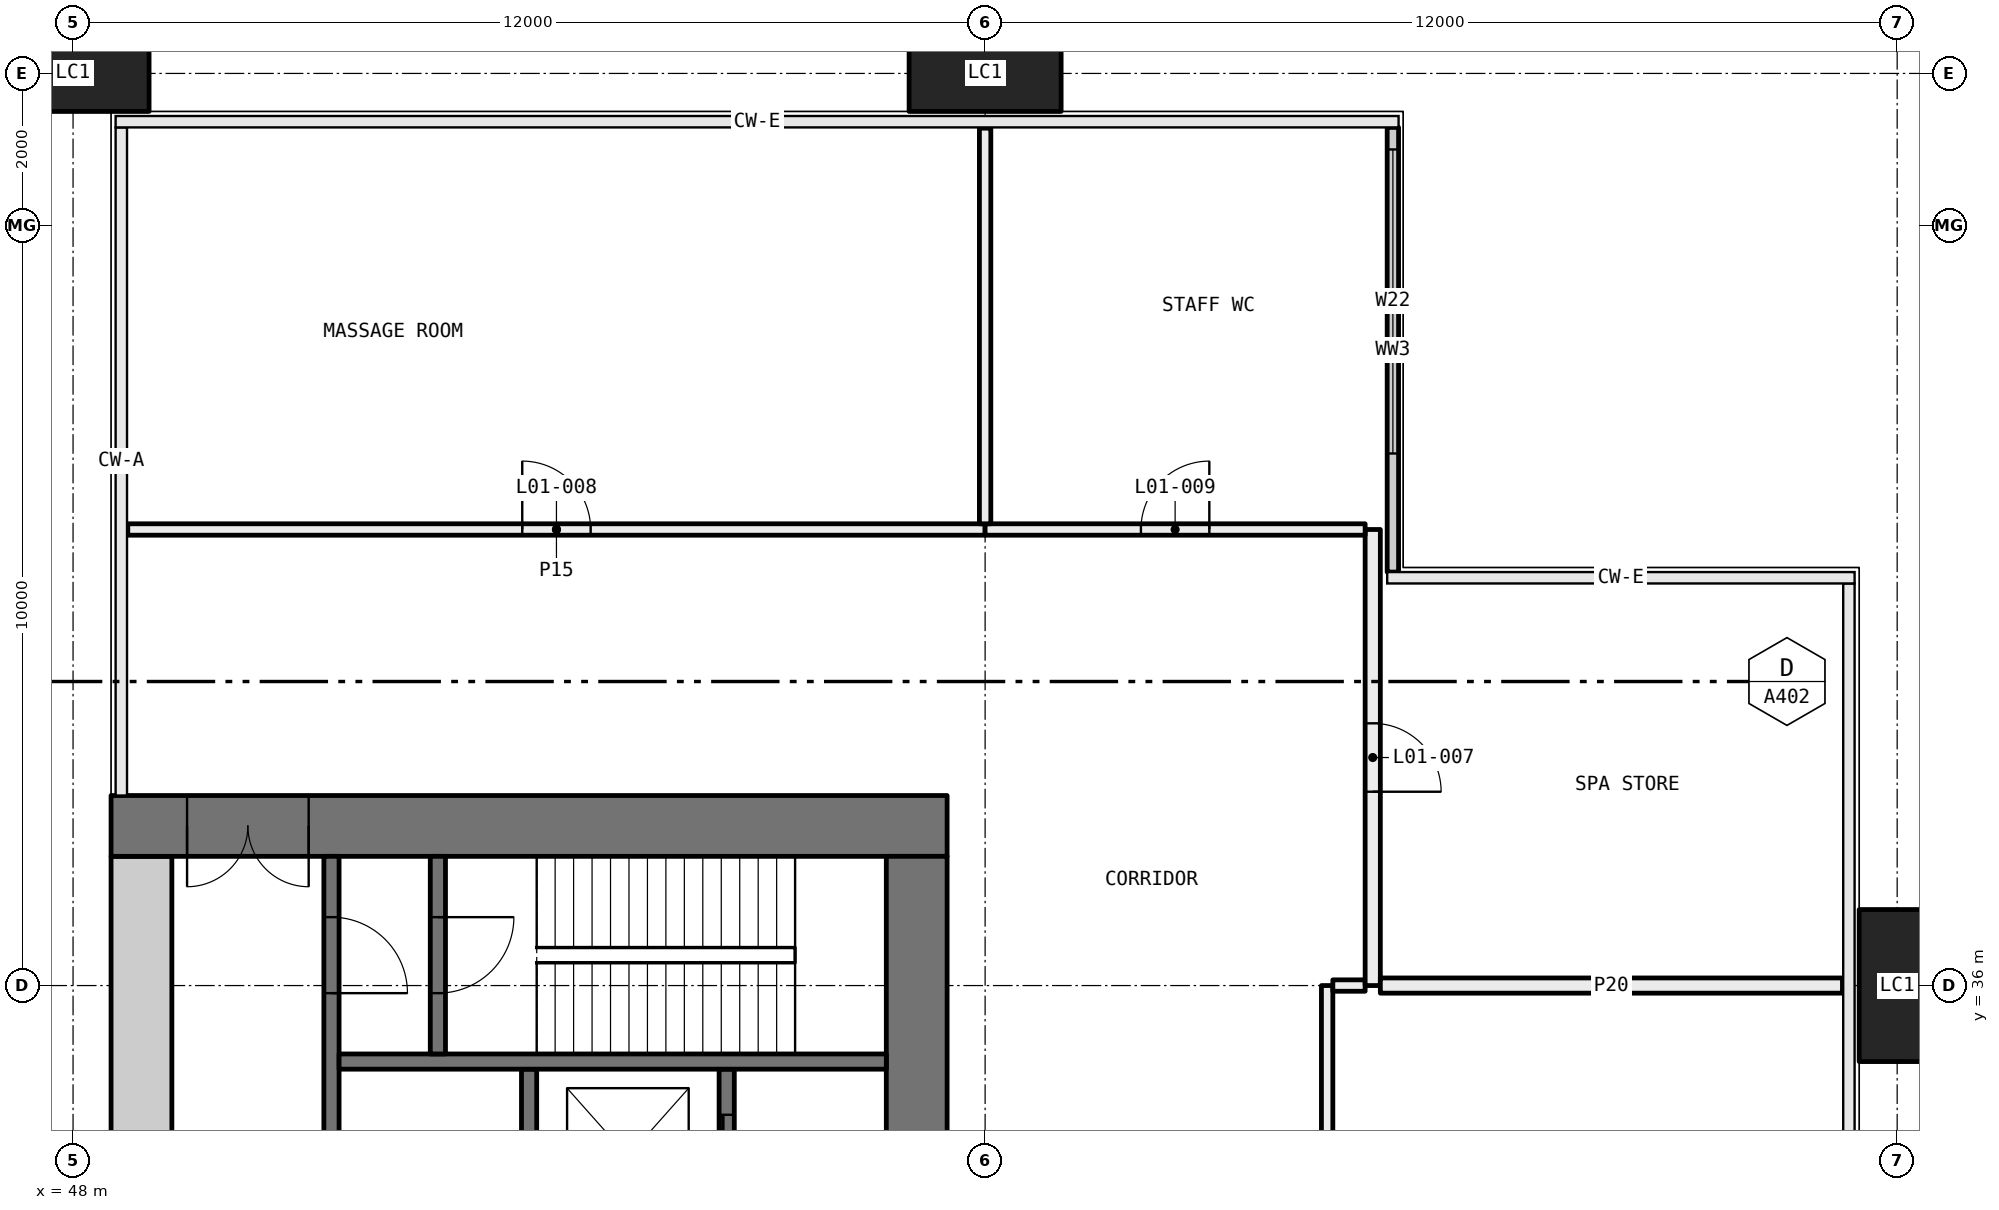
"""IFC4 building model, lengths in metres.
Left out: names, types, materials, properties, quantities, classifications, styles, units other than length and angle.
Written with IfcOpenShell. Run it as: python <this file> out.ifc"""

import sys

from ifc_helpers import new_model, si_unit, direction, frame, frame_2d, origin, origin_2d, place, context, subcontext, project, spatial, rectangle, hollow_rectangle, extrude, element, fill, save


model = new_model("IFC4")
c1 = context("Model", 3, precision=1e-05, world=origin(), true_north=direction((0.0, 1.0)))
c2 = subcontext(c1, "Body", "Model", "MODEL_VIEW")
j1 = project(units=[si_unit("LENGTHUNIT", "METRE"), si_unit("PLANEANGLEUNIT", "RADIAN")], contexts=[c1])
p1 = place(None, origin())
s1 = spatial("IfcSite", under=j1, at=p1, CompositionType="ELEMENT")
p2 = place(p1, origin())
s2 = spatial("IfcBuilding", under=s1, at=p2, CompositionType="ELEMENT")
p3 = place(p2, frame((0.0, 0.0, 6.0)))
s3 = spatial("IfcBuildingStorey", under=s2, at=p3, CompositionType="ELEMENT", Elevation=6.0)
for number, where, z_axis, x_axis in (
    (1, (48.0, 48.0, -0.4), (0.0, 0.0, 1.0), (1.0, 0.0, 0.0)),
    (2, (60.0, 48.0, -0.4), (0.0, 0.0, 1.0), (1.0, 0.0, 0.0)),
    (3, (72.0, 36.0, -0.4), (0.0, 0.0, 1.0), (0.0, 1.0, 0.0)),
):
    element("IfcColumn", number, at=place(p3, frame(where, z_axis=z_axis, x_axis=x_axis)), inside=s3, PredefinedType="COLUMN", context=c2, shape_type="SweptSolid", body=[
        extrude(hollow_rectangle(XDim=2.0, YDim=1.0, WallThickness=0.08, at=origin_2d()), origin(), (0.0, 0.0, 1.0), 6.0),
    ])
p4 = place(p3, frame((65.365, 41.44, 0.0), z_axis=(0.0, 0.0, 1.0), x_axis=(0.0, 1.0, 0.0)))
e4 = element("IfcWall", 4, at=p4, inside=s3, PredefinedType="ELEMENTEDWALL", context=c2, shape_type="SweptSolid", body=[
    extrude(rectangle(XDim=5.85, YDim=0.15, at=frame_2d((2.925, 0.0))), origin(), (0.0, 0.0, 1.0), 5.6),
])
p5 = place(p4, frame((1.56, 0.0, 0.45)))
e5 = element("IfcOpeningElement", 5, at=p5, cuts=e4, PredefinedType="OPENING", context=c2, shape_type="SweptSolid", body=[
    extrude(rectangle(XDim=4.0, YDim=5.1, at=frame_2d((2.0, 2.55))), frame((0.0, 0.085, 0.0), z_axis=(0.0, -1.0, 0.0), x_axis=(1.0, 0.0, 0.0)), (0.0, 0.0, 1.0), 0.17),
])
p6 = place(p3, frame((64.5, 30.075, 0.0), z_axis=(0.0, 0.0, 1.0), x_axis=(0.0, 1.0, 0.0)))
e6 = element("IfcWall", 6, at=p6, inside=s3, PredefinedType="PARTITIONING", context=c2, shape_type="SweptSolid", body=[
    extrude(rectangle(XDim=5.925, YDim=0.15, at=frame_2d((2.962, 0.0))), origin(), (0.0, 0.0, 1.0), 5.0),
])
p7 = place(p6, frame((2.512, 0.0, 0.0)))
e7 = element("IfcOpeningElement", 7, at=p7, cuts=e6, PredefinedType="OPENING", context=c2, shape_type="SweptSolid", body=[
    extrude(rectangle(XDim=0.9, YDim=2.1, at=frame_2d((0.45, 1.05))), frame((0.0, 0.085, 0.0), z_axis=(0.0, -1.0, 0.0), x_axis=(1.0, 0.0, 0.0)), (0.0, 0.0, 1.0), 0.17),
])
p8 = place(p3, frame((64.575, 36.0, 0.0), z_axis=(0.0, 0.0, 1.0), x_axis=(1.0, 0.0, 0.0)))
e8 = element("IfcWall", 8, at=p8, inside=s3, PredefinedType="PARTITIONING", context=c2, shape_type="SweptSolid", body=[
    extrude(rectangle(XDim=0.425, YDim=0.15, at=frame_2d((0.212, 0.0))), origin(), (0.0, 0.0, 1.0), 5.0),
])
p9 = place(p3, frame((65.1, 36.0, 0.0), z_axis=(0.0, 0.0, 1.0), x_axis=(0.0, 1.0, 0.0)))
e9 = element("IfcWall", 9, at=p9, inside=s3, PredefinedType="PARTITIONING", context=c2, shape_type="SweptSolid", body=[
    extrude(rectangle(XDim=6.0, YDim=0.2, at=frame_2d((3.0, 0.0))), origin(), (0.0, 0.0, 1.0), 5.0),
])
p10 = place(p9, frame((2.55, 0.0, 0.0)))
e10 = element("IfcOpeningElement", 10, at=p10, cuts=e9, PredefinedType="OPENING", context=c2, shape_type="SweptSolid", body=[
    extrude(rectangle(XDim=0.9, YDim=2.1, at=frame_2d((0.45, 1.05))), frame((0.0, 0.11, 0.0), z_axis=(0.0, -1.0, 0.0), x_axis=(1.0, 0.0, 0.0)), (0.0, 0.0, 1.0), 0.22),
])
p11 = place(p3, frame((60.0, 42.0, 0.0), z_axis=(0.0, 0.0, 1.0), x_axis=(-1.0, 0.0, 0.0)))
e11 = element("IfcWall", 11, at=p11, inside=s3, PredefinedType="PARTITIONING", context=c2, shape_type="SweptSolid", body=[
    extrude(rectangle(XDim=11.28, YDim=0.15, at=frame_2d((5.64, 0.0))), origin(), (0.0, 0.0, 1.0), 5.6),
])
p12 = place(p11, frame((5.19, 0.0, 0.0)))
e12 = element("IfcOpeningElement", 12, at=p12, cuts=e11, PredefinedType="OPENING", context=c2, shape_type="SweptSolid", body=[
    extrude(rectangle(XDim=0.9, YDim=2.1, at=frame_2d((0.45, 1.05))), frame((0.0, 0.085, 0.0), z_axis=(0.0, -1.0, 0.0), x_axis=(1.0, 0.0, 0.0)), (0.0, 0.0, 1.0), 0.17),
])
p13 = place(p3, frame((65.0, 42.0, 0.0), z_axis=(0.0, 0.0, 1.0), x_axis=(-1.0, 0.0, 0.0)))
e13 = element("IfcWall", 13, at=p13, inside=s3, PredefinedType="PARTITIONING", context=c2, shape_type="SweptSolid", body=[
    extrude(rectangle(XDim=5.0, YDim=0.15, at=frame_2d((2.5, 0.0))), origin(), (0.0, 0.0, 1.0), 5.6),
])
p14 = place(p13, frame((2.05, 0.0, 0.0)))
e14 = element("IfcOpeningElement", 14, at=p14, cuts=e13, PredefinedType="OPENING", context=c2, shape_type="SweptSolid", body=[
    extrude(rectangle(XDim=0.9, YDim=2.1, at=frame_2d((0.45, 1.05))), frame((0.0, 0.085, 0.0), z_axis=(0.0, -1.0, 0.0), x_axis=(1.0, 0.0, 0.0)), (0.0, 0.0, 1.0), 0.17),
])
p15 = place(p3, frame((71.28, 36.0, 0.0), z_axis=(0.0, 0.0, 1.0), x_axis=(-1.0, 0.0, 0.0)))
e15 = element("IfcWall", 15, at=p15, inside=s3, PredefinedType="PARTITIONING", context=c2, shape_type="SweptSolid", body=[
    extrude(rectangle(XDim=6.08, YDim=0.2, at=frame_2d((3.04, 0.0))), origin(), (0.0, 0.0, 1.0), 5.0),
])
p16 = place(p3, frame((60.0, 42.075, 0.0), z_axis=(0.0, 0.0, 1.0), x_axis=(0.0, 1.0, 0.0)))
e16 = element("IfcWall", 16, at=p16, inside=s3, PredefinedType="PARTITIONING", context=c2, shape_type="SweptSolid", body=[
    extrude(rectangle(XDim=5.205, YDim=0.15, at=frame_2d((2.603, 0.0))), origin(), (0.0, 0.0, 1.0), 5.6),
])
p17 = place(p3, frame((59.5, 38.1, 0.0), z_axis=(0.0, 0.0, 1.0), x_axis=(-1.0, 0.0, 0.0)))
e17 = element("IfcWall", 17, at=p17, inside=s3, PredefinedType="SHEAR", context=c2, shape_type="SweptSolid", body=[
    extrude(rectangle(XDim=11.0, YDim=0.8, at=frame_2d((5.5, 0.0))), origin(), (0.0, 0.0, 1.0), 5.6),
])
p18 = place(p17, frame((8.4, 0.0, 0.0)))
e18 = element("IfcOpeningElement", 18, at=p18, cuts=e17, PredefinedType="OPENING", context=c2, shape_type="SweptSolid", body=[
    extrude(rectangle(XDim=1.6, YDim=2.1, at=frame_2d((0.8, 1.05))), frame((0.0, 0.41, 0.0), z_axis=(0.0, -1.0, 0.0), x_axis=(1.0, 0.0, 0.0)), (0.0, 0.0, 1.0), 0.82),
])
p19 = place(p3, frame((59.1, 22.3, 0.0), z_axis=(0.0, 0.0, 1.0), x_axis=(0.0, 1.0, 0.0)))
e19 = element("IfcWall", 19, at=p19, inside=s3, PredefinedType="SHEAR", context=c2, shape_type="SweptSolid", body=[
    extrude(rectangle(XDim=15.4, YDim=0.8, at=frame_2d((7.7, 0.0))), origin(), (0.0, 0.0, 1.0), 5.6),
])
p20 = place(p19, frame((8.15, 0.0, 0.0)))
e20 = element("IfcOpeningElement", 20, at=p20, cuts=e19, PredefinedType="OPENING", context=c2, shape_type="SweptSolid", body=[
    extrude(rectangle(XDim=1.6, YDim=2.1, at=frame_2d((0.8, 1.05))), frame((0.0, 0.41, 0.0), z_axis=(0.0, -1.0, 0.0), x_axis=(1.0, 0.0, 0.0)), (0.0, 0.0, 1.0), 0.82),
])
p21 = place(p19, frame((2.05, 0.0, 0.0)))
e21 = element("IfcOpeningElement", 21, at=p21, cuts=e19, PredefinedType="OPENING", context=c2, shape_type="SweptSolid", body=[
    extrude(rectangle(XDim=1.0, YDim=2.1, at=frame_2d((0.5, 1.05))), frame((0.0, 0.41, 0.0), z_axis=(0.0, -1.0, 0.0), x_axis=(1.0, 0.0, 0.0)), (0.0, 0.0, 1.0), 0.82),
])
p22 = place(p3, frame((48.9, 22.3, 0.0), z_axis=(0.0, 0.0, 1.0), x_axis=(0.0, 1.0, 0.0)))
e22 = element("IfcWall", 22, at=p22, inside=s3, PredefinedType="SHEAR", context=c2, shape_type="SweptSolid", body=[
    extrude(rectangle(XDim=15.4, YDim=0.8, at=frame_2d((7.7, 0.0))), origin(), (0.0, 0.0, 1.0), 5.6),
])
p23 = place(p3, frame((56.6, 22.3, 0.0), z_axis=(0.0, 0.0, 1.0), x_axis=(0.0, 1.0, 0.0)))
e23 = element("IfcWall", 23, at=p23, inside=s3, PredefinedType="SOLIDWALL", context=c2, shape_type="SweptSolid", body=[
    extrude(rectangle(XDim=12.6, YDim=0.2, at=frame_2d((6.3, 0.0))), origin(), (0.0, 0.0, 1.0), 5.6),
])
p24 = place(p23, frame((3.4, 0.0, 0.0)))
e24 = element("IfcOpeningElement", 24, at=p24, cuts=e23, PredefinedType="OPENING", context=c2, shape_type="SweptSolid", body=[
    extrude(rectangle(XDim=1.1, YDim=2.1, at=frame_2d((0.55, 1.05))), frame((0.0, 0.11, 0.0), z_axis=(0.0, -1.0, 0.0), x_axis=(1.0, 0.0, 0.0)), (0.0, 0.0, 1.0), 0.22),
])
p25 = place(p23, frame((5.9, 0.0, 0.0)))
e25 = element("IfcOpeningElement", 25, at=p25, cuts=e23, PredefinedType="OPENING", context=c2, shape_type="SweptSolid", body=[
    extrude(rectangle(XDim=1.1, YDim=2.1, at=frame_2d((0.55, 1.05))), frame((0.0, 0.11, 0.0), z_axis=(0.0, -1.0, 0.0), x_axis=(1.0, 0.0, 0.0)), (0.0, 0.0, 1.0), 0.22),
])
p26 = place(p23, frame((8.4, 0.0, 0.0)))
e26 = element("IfcOpeningElement", 26, at=p26, cuts=e23, PredefinedType="OPENING", context=c2, shape_type="SweptSolid", body=[
    extrude(rectangle(XDim=1.1, YDim=2.1, at=frame_2d((0.55, 1.05))), frame((0.0, 0.11, 0.0), z_axis=(0.0, -1.0, 0.0), x_axis=(1.0, 0.0, 0.0)), (0.0, 0.0, 1.0), 0.22),
])
p27 = place(p23, frame((10.9, 0.0, 0.0)))
e27 = element("IfcOpeningElement", 27, at=p27, cuts=e23, PredefinedType="OPENING", context=c2, shape_type="SweptSolid", body=[
    extrude(rectangle(XDim=1.1, YDim=2.1, at=frame_2d((0.55, 1.05))), frame((0.0, 0.11, 0.0), z_axis=(0.0, -1.0, 0.0), x_axis=(1.0, 0.0, 0.0)), (0.0, 0.0, 1.0), 0.22),
])
p28 = place(p23, frame((0.15, 0.0, 0.0)))
e28 = element("IfcOpeningElement", 28, at=p28, cuts=e23, PredefinedType="OPENING", context=c2, shape_type="SweptSolid", body=[
    extrude(rectangle(XDim=1.0, YDim=2.1, at=frame_2d((0.5, 1.05))), frame((0.0, 0.11, 0.0), z_axis=(0.0, -1.0, 0.0), x_axis=(1.0, 0.0, 0.0)), (0.0, 0.0, 1.0), 0.22),
])
p29 = place(p3, frame((51.4, 25.1, 0.0), z_axis=(0.0, 0.0, 1.0), x_axis=(0.0, 1.0, 0.0)))
e29 = element("IfcWall", 29, at=p29, inside=s3, PredefinedType="SOLIDWALL", context=c2, shape_type="SweptSolid", body=[
    extrude(rectangle(XDim=12.6, YDim=0.2, at=frame_2d((6.3, 0.0))), origin(), (0.0, 0.0, 1.0), 5.6),
])
p30 = place(p29, frame((0.6, 0.0, 0.0)))
e30 = element("IfcOpeningElement", 30, at=p30, cuts=e29, PredefinedType="OPENING", context=c2, shape_type="SweptSolid", body=[
    extrude(rectangle(XDim=1.1, YDim=2.1, at=frame_2d((0.55, 1.05))), frame((0.0, 0.11, 0.0), z_axis=(0.0, -1.0, 0.0), x_axis=(1.0, 0.0, 0.0)), (0.0, 0.0, 1.0), 0.22),
])
p31 = place(p29, frame((10.8, 0.0, 0.0)))
e31 = element("IfcOpeningElement", 31, at=p31, cuts=e29, PredefinedType="OPENING", context=c2, shape_type="SweptSolid", body=[
    extrude(rectangle(XDim=1.0, YDim=2.1, at=frame_2d((0.5, 1.05))), frame((0.0, 0.11, 0.0), z_axis=(0.0, -1.0, 0.0), x_axis=(1.0, 0.0, 0.0)), (0.0, 0.0, 1.0), 0.22),
])
p32 = place(p29, frame((5.7, 0.0, 0.0)))
e32 = element("IfcOpeningElement", 32, at=p32, cuts=e29, PredefinedType="OPENING", context=c2, shape_type="SweptSolid", body=[
    extrude(rectangle(XDim=0.9, YDim=2.1, at=frame_2d((0.45, 1.05))), frame((0.0, 0.11, 0.0), z_axis=(0.0, -1.0, 0.0), x_axis=(1.0, 0.0, 0.0)), (0.0, 0.0, 1.0), 0.22),
])
p33 = place(p3, frame((54.0, 25.1, 0.0), z_axis=(0.0, 0.0, 1.0), x_axis=(0.0, 1.0, 0.0)))
e33 = element("IfcWall", 33, at=p33, inside=s3, PredefinedType="SOLIDWALL", context=c2, shape_type="SweptSolid", body=[
    extrude(rectangle(XDim=9.8, YDim=0.2, at=frame_2d((4.9, 0.0))), origin(), (0.0, 0.0, 1.0), 5.6),
])
p34 = place(p3, frame((58.7, 35.0, 0.0), z_axis=(0.0, 0.0, 1.0), x_axis=(-1.0, 0.0, 0.0)))
e34 = element("IfcWall", 34, at=p34, inside=s3, PredefinedType="SOLIDWALL", context=c2, shape_type="SweptSolid", body=[
    extrude(rectangle(XDim=7.2, YDim=0.2, at=frame_2d((3.6, 0.0))), origin(), (0.0, 0.0, 1.0), 5.6),
])
p35 = place(p3, frame((52.8, 35.1, 0.0), z_axis=(0.0, 0.0, 1.0), x_axis=(0.0, 1.0, 0.0)))
e35 = element("IfcWall", 35, at=p35, inside=s3, PredefinedType="SOLIDWALL", context=c2, shape_type="SweptSolid", body=[
    extrude(rectangle(XDim=2.6, YDim=0.2, at=frame_2d((1.3, 0.0))), origin(), (0.0, 0.0, 1.0), 5.6),
])
p36 = place(p35, frame((0.8, 0.0, 0.0)))
e36 = element("IfcOpeningElement", 36, at=p36, cuts=e35, PredefinedType="OPENING", context=c2, shape_type="SweptSolid", body=[
    extrude(rectangle(XDim=1.0, YDim=2.1, at=frame_2d((0.5, 1.05))), frame((0.0, 0.11, 0.0), z_axis=(0.0, -1.0, 0.0), x_axis=(1.0, 0.0, 0.0)), (0.0, 0.0, 1.0), 0.22),
])
p37 = place(p5, origin())
e37 = element("IfcWindow", 37, at=p37, inside=s3, PartitioningType="SINGLE_PANEL", PredefinedType="WINDOW", context=c2, shape_type="SweptSolid", body=[
    extrude(rectangle(XDim=4.0, YDim=5.1, at=frame_2d((2.0, 2.55))), frame((0.0, 0.03, 0.0), z_axis=(0.0, -1.0, 0.0), x_axis=(1.0, 0.0, 0.0)), (0.0, 0.0, 1.0), 0.06),
])
fill(e5, e37)
p38 = place(p10, frame((0.9, 0.0, 0.0), x_axis=(-1.0, 0.0, 0.0)))
e38 = element("IfcDoor", 38, at=p38, inside=s3, OperationType="SINGLE_SWING_LEFT", PredefinedType="DOOR", context=c2, shape_type="SweptSolid", body=[
    extrude(rectangle(XDim=0.9, YDim=2.1, at=frame_2d((0.45, 1.05))), frame((0.0, 0.025, 0.0), z_axis=(0.0, -1.0, 0.0), x_axis=(1.0, 0.0, 0.0)), (0.0, 0.0, 1.0), 0.05),
])
fill(e10, e38)
p39 = place(p12, frame((0.9, 0.0, 0.0), x_axis=(-1.0, 0.0, 0.0)))
e39 = element("IfcDoor", 39, at=p39, inside=s3, OperationType="SINGLE_SWING_RIGHT", PredefinedType="DOOR", context=c2, shape_type="SweptSolid", body=[
    extrude(rectangle(XDim=0.9, YDim=2.1, at=frame_2d((0.45, 1.05))), frame((0.0, 0.025, 0.0), z_axis=(0.0, -1.0, 0.0), x_axis=(1.0, 0.0, 0.0)), (0.0, 0.0, 1.0), 0.05),
])
fill(e12, e39)
p40 = place(p14, frame((0.9, 0.0, 0.0), x_axis=(-1.0, 0.0, 0.0)))
e40 = element("IfcDoor", 40, at=p40, inside=s3, OperationType="SINGLE_SWING_LEFT", PredefinedType="DOOR", context=c2, shape_type="SweptSolid", body=[
    extrude(rectangle(XDim=0.9, YDim=2.1, at=frame_2d((0.45, 1.05))), frame((0.0, 0.025, 0.0), z_axis=(0.0, -1.0, 0.0), x_axis=(1.0, 0.0, 0.0)), (0.0, 0.0, 1.0), 0.05),
])
fill(e14, e40)
p41 = place(p27, origin())
e41 = element("IfcDoor", 41, at=p41, inside=s3, OperationType="SLIDING_TO_LEFT", PredefinedType="DOOR", context=c2, shape_type="SweptSolid", body=[
    extrude(rectangle(XDim=1.1, YDim=2.1, at=frame_2d((0.55, 1.05))), frame((0.0, 0.025, 0.0), z_axis=(0.0, -1.0, 0.0), x_axis=(1.0, 0.0, 0.0)), (0.0, 0.0, 1.0), 0.05),
])
fill(e27, e41)
p42 = place(p31, frame((1.0, 0.0, 0.0), x_axis=(-1.0, 0.0, 0.0)))
e42 = element("IfcDoor", 42, at=p42, inside=s3, OperationType="SINGLE_SWING_LEFT", PredefinedType="DOOR", context=c2, shape_type="SweptSolid", body=[
    extrude(rectangle(XDim=1.0, YDim=2.1, at=frame_2d((0.5, 1.05))), frame((0.0, 0.025, 0.0), z_axis=(0.0, -1.0, 0.0), x_axis=(1.0, 0.0, 0.0)), (0.0, 0.0, 1.0), 0.05),
])
fill(e31, e42)
p43 = place(p36, frame((1.0, 0.0, 0.0), x_axis=(-1.0, 0.0, 0.0)))
e43 = element("IfcDoor", 43, at=p43, inside=s3, OperationType="SINGLE_SWING_RIGHT", PredefinedType="DOOR", context=c2, shape_type="SweptSolid", body=[
    extrude(rectangle(XDim=1.0, YDim=2.1, at=frame_2d((0.5, 1.05))), frame((0.0, 0.025, 0.0), z_axis=(0.0, -1.0, 0.0), x_axis=(1.0, 0.0, 0.0)), (0.0, 0.0, 1.0), 0.05),
])
fill(e36, e43)
p44 = place(p18, origin())
e44 = element("IfcDoor", 44, at=p44, inside=s3, OperationType="DOUBLE_DOOR_SINGLE_SWING", PredefinedType="DOOR", context=c2, shape_type="SweptSolid", body=[
    extrude(rectangle(XDim=1.6, YDim=2.1, at=frame_2d((0.8, 1.05))), frame((0.0, 0.025, 0.0), z_axis=(0.0, -1.0, 0.0), x_axis=(1.0, 0.0, 0.0)), (0.0, 0.0, 1.0), 0.05),
])
fill(e18, e44)
save(model, sys.argv[1])
